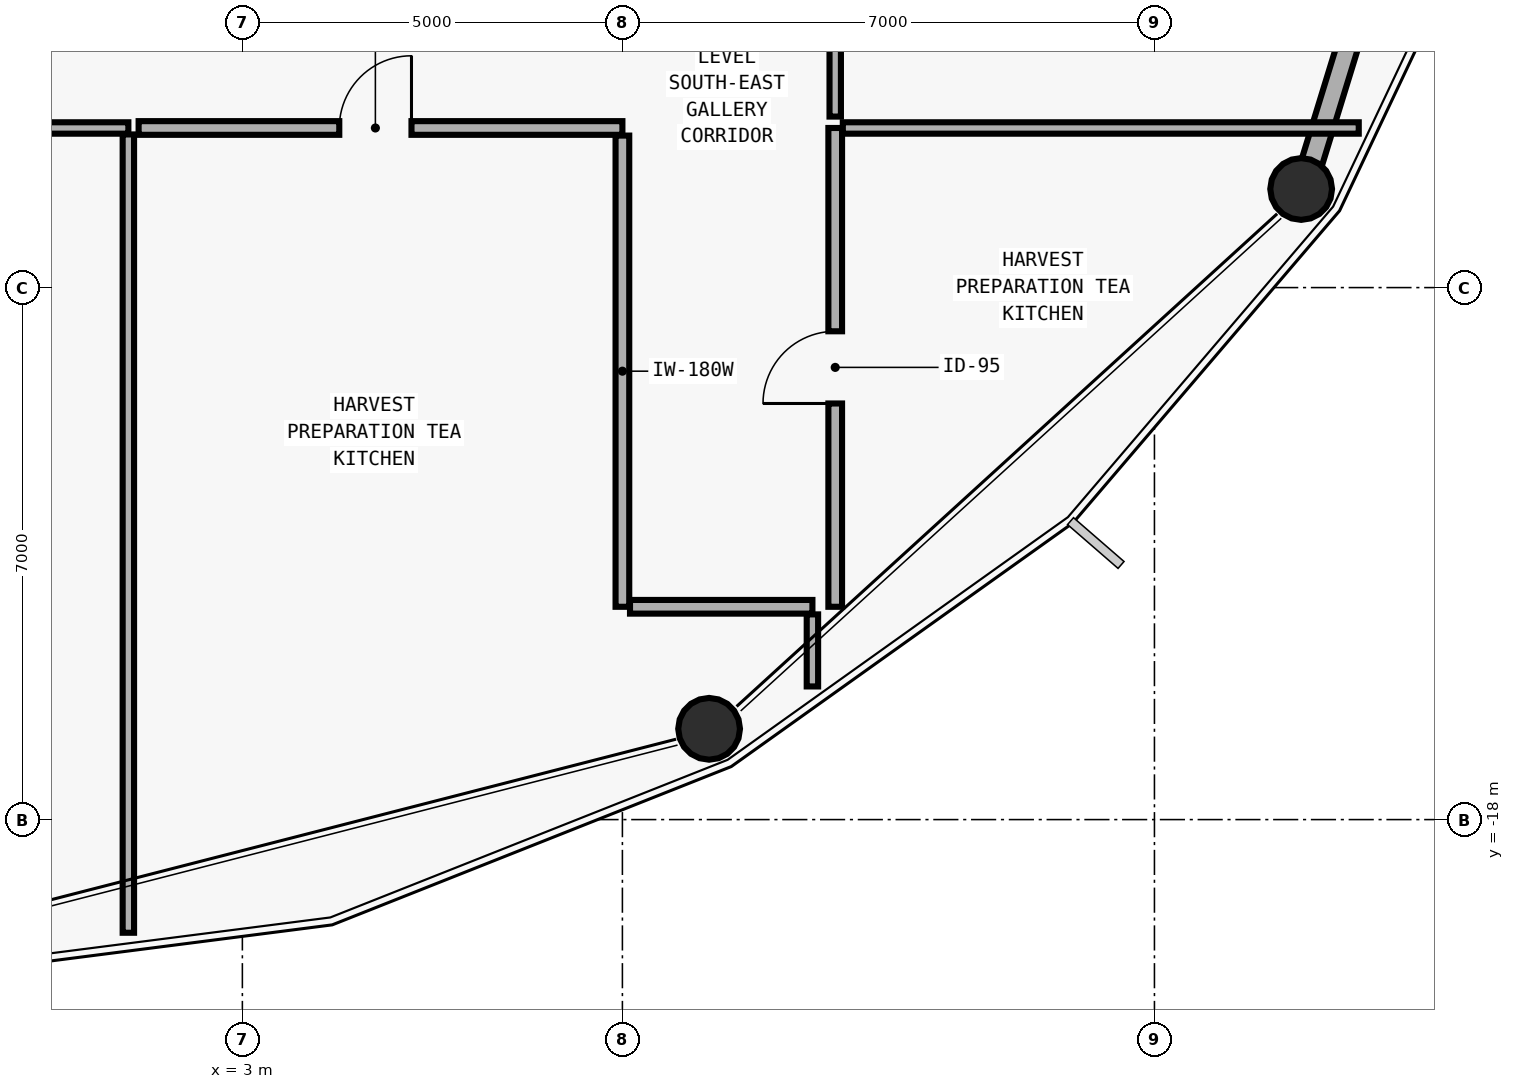
"""IFC4 building model, lengths in metres.
Left out: names, types, materials, properties, quantities, classifications, styles, units other than length and angle.
Written with IfcOpenShell. Run it as: python <this file> out.ifc"""

import sys

from ifc_helpers import new_model, si_unit, direction, frame, frame_2d, origin, origin_2d, place, context, subcontext, project, spatial, rectangle, hollow_circle, extrude, element, fill, save


model = new_model("IFC4")
c1 = context("Model", 3, precision=1e-05, world=origin(), true_north=direction((0.0, 1.0)))
c2 = subcontext(c1, "Body", "Model", "MODEL_VIEW")
j1 = project(units=[si_unit("LENGTHUNIT", "METRE"), si_unit("PLANEANGLEUNIT", "RADIAN")], contexts=[c1])
p1 = place(None, origin())
s1 = spatial("IfcSite", under=j1, at=p1, CompositionType="ELEMENT")
p2 = place(p1, origin())
s2 = spatial("IfcBuilding", under=s1, at=p2, CompositionType="ELEMENT")
p3 = place(p2, frame((0.0, 0.0, 111.0)))
s3 = spatial("IfcBuildingStorey", under=s2, at=p3, CompositionType="ELEMENT", Elevation=111.0)
p4 = place(p3, frame((9.157, -16.826, 0.0), z_axis=(-0.008630758912, 0.010457707878, 0.999908068948), x_axis=(-0.771259229251, -0.636521171129, 0.0)))
e1 = element("IfcColumn", 1, at=p4, inside=s3, PredefinedType="COLUMN", context=c2, shape_type="SweptSolid", body=[
    extrude(hollow_circle(Radius=0.406, WallThickness=0.03, at=origin_2d()), origin(), (0.0, 0.0, 1.0), 3.875),
])
p5 = place(p3, frame((16.959, -9.715, 0.0), z_axis=(-0.014930012538, 0.006110595849, 0.999869869205), x_axis=(-0.378784893666, -0.925484740193, 0.0)))
e2 = element("IfcColumn", 2, at=p5, inside=s3, PredefinedType="COLUMN", context=c2, shape_type="SweptSolid", body=[
    extrude(hollow_circle(Radius=0.406, WallThickness=0.03, at=origin_2d()), origin(), (0.0, 0.0, 1.0), 3.875),
])
p6 = place(p3, frame((19.844, -0.345, 0.0), z_axis=(0.0, 0.0, 1.0), x_axis=(-0.294220311177, -0.95573762534, 0.0)))
e3 = element("IfcWall", 3, at=p6, inside=s3, PredefinedType="SOLIDWALL", context=c2, shape_type="SweptSolid", body=[
    extrude(rectangle(XDim=9.441, YDim=0.28, at=frame_2d((4.721, 0.0))), origin(), (0.0, 0.0, 1.0), 3.11),
])
p7 = place(p3, frame((-7.865, -8.9, 0.0), z_axis=(0.0, 0.0, 1.0), x_axis=(1.0, 0.0, 0.0)))
e4 = element("IfcWall", 4, at=p7, inside=s3, PredefinedType="PARTITIONING", context=c2, shape_type="SweptSolid", body=[
    extrude(rectangle(XDim=9.365, YDim=0.15, at=frame_2d((4.683, 0.0))), origin(), (0.0, 0.0, 1.0), 3.64),
])
p8 = place(p7, frame((4.14, 0.0, 0.0)))
e5 = element("IfcOpeningElement", 5, at=p8, cuts=e4, PredefinedType="OPENING", context=c2, shape_type="SweptSolid", body=[
    extrude(rectangle(XDim=0.95, YDim=2.1, at=frame_2d((0.475, 1.05))), frame((0.0, 0.085, 0.0), z_axis=(0.0, -1.0, 0.0), x_axis=(1.0, 0.0, 0.0)), (0.0, 0.0, 1.0), 0.17),
])
p9 = place(p3, frame((1.635, -8.9, 0.0), z_axis=(0.0, 0.0, 1.0), x_axis=(1.0, 0.0, 0.0)))
e6 = element("IfcWall", 6, at=p9, inside=s3, PredefinedType="PLUMBINGWALL", context=c2, shape_type="SweptSolid", body=[
    extrude(rectangle(XDim=6.365, YDim=0.18, at=frame_2d((3.183, 0.0))), origin(), (0.0, 0.0, 1.0), 3.64),
])
p10 = place(p9, frame((2.64, 0.0, 0.0)))
e7 = element("IfcOpeningElement", 7, at=p10, cuts=e6, PredefinedType="OPENING", context=c2, shape_type="SweptSolid", body=[
    extrude(rectangle(XDim=0.95, YDim=2.1, at=frame_2d((0.475, 1.05))), frame((0.0, 0.1, 0.0), z_axis=(0.0, -1.0, 0.0), x_axis=(1.0, 0.0, 0.0)), (0.0, 0.0, 1.0), 0.2),
])
p11 = place(p3, frame((10.8, -15.2, 0.0), z_axis=(0.0, 0.0, 1.0), x_axis=(0.0, 1.0, 0.0)))
e8 = element("IfcWall", 8, at=p11, inside=s3, PredefinedType="PLUMBINGWALL", context=c2, shape_type="SweptSolid", body=[
    extrude(rectangle(XDim=6.3, YDim=0.18, at=frame_2d((3.15, 0.0))), origin(), (0.0, 0.0, 1.0), 3.64),
])
p12 = place(p11, frame((2.675, 0.0, 0.0)))
e9 = element("IfcOpeningElement", 9, at=p12, cuts=e8, PredefinedType="OPENING", context=c2, shape_type="SweptSolid", body=[
    extrude(rectangle(XDim=0.95, YDim=2.1, at=frame_2d((0.475, 1.05))), frame((0.0, 0.1, 0.0), z_axis=(0.0, -1.0, 0.0), x_axis=(1.0, 0.0, 0.0)), (0.0, 0.0, 1.0), 0.2),
])
p13 = place(p3, frame((1.5, -8.985, 0.0), z_axis=(0.0, 0.0, 1.0), x_axis=(0.0, -1.0, 0.0)))
e10 = element("IfcWall", 10, at=p13, inside=s3, PredefinedType="PARTITIONING", context=c2, shape_type="SweptSolid", body=[
    extrude(rectangle(XDim=10.504, YDim=0.15, at=frame_2d((5.252, 0.0))), origin(), (0.0, 0.0, 1.0), 3.64),
])
p14 = place(p3, frame((8.0, -9.0, 0.0), z_axis=(0.0, 0.0, 1.0), x_axis=(0.0, -1.0, 0.0)))
e11 = element("IfcWall", 11, at=p14, inside=s3, PredefinedType="PLUMBINGWALL", context=c2, shape_type="SweptSolid", body=[
    extrude(rectangle(XDim=6.2, YDim=0.18, at=frame_2d((3.1, 0.0))), origin(), (0.0, 0.0, 1.0), 3.022),
])
p15 = place(p3, frame((8.1, -15.2, 0.0), z_axis=(0.0, 0.0, 1.0), x_axis=(1.0, 0.0, 0.0)))
e12 = element("IfcWall", 12, at=p15, inside=s3, PredefinedType="PLUMBINGWALL", context=c2, shape_type="SweptSolid", body=[
    extrude(rectangle(XDim=2.4, YDim=0.18, at=frame_2d((1.2, 0.0))), origin(), (0.0, 0.0, 1.0), 3.64),
])
p16 = place(p3, frame((10.5, -15.3, 0.0), z_axis=(0.0, 0.0, 1.0), x_axis=(0.0, -1.0, 0.0)))
e13 = element("IfcWall", 13, at=p16, inside=s3, PredefinedType="PARTITIONING", context=c2, shape_type="SweptSolid", body=[
    extrude(rectangle(XDim=0.948, YDim=0.15, at=frame_2d((0.474, 0.0))), origin(), (0.0, 0.0, 1.0), 3.64),
])
p17 = place(p3, frame((10.9, -8.9, 0.0), z_axis=(0.0, 0.0, 1.0), x_axis=(1.0, 0.0, 0.0)))
e14 = element("IfcWall", 14, at=p17, inside=s3, PredefinedType="PARTITIONING", context=c2, shape_type="SweptSolid", body=[
    extrude(rectangle(XDim=6.788, YDim=0.15, at=frame_2d((3.394, 0.0))), origin(), (0.0, 0.0, 1.0), 3.022),
])
p18 = place(p3, frame((10.8, -8.75, 0.0), z_axis=(0.0, 0.0, 1.0), x_axis=(0.0, 1.0, 0.0)))
e15 = element("IfcWall", 15, at=p18, inside=s3, PredefinedType="PARTITIONING", context=c2, shape_type="SweptSolid", body=[
    extrude(rectangle(XDim=2.15, YDim=0.15, at=frame_2d((1.075, 0.0))), origin(), (0.0, 0.0, 1.0), 3.64),
])
p19 = place(p10, origin())
e16 = element("IfcDoor", 16, at=p19, inside=s3, OperationType="SINGLE_SWING_RIGHT", PredefinedType="DOOR", context=c2, shape_type="SweptSolid", body=[
    extrude(rectangle(XDim=0.95, YDim=2.1, at=frame_2d((0.475, 1.05))), frame((0.0, 0.025, 0.0), z_axis=(0.0, -1.0, 0.0), x_axis=(1.0, 0.0, 0.0)), (0.0, 0.0, 1.0), 0.05),
])
fill(e7, e16)
p20 = place(p12, origin())
e17 = element("IfcDoor", 17, at=p20, inside=s3, OperationType="SINGLE_SWING_LEFT", PredefinedType="DOOR", context=c2, shape_type="SweptSolid", body=[
    extrude(rectangle(XDim=0.95, YDim=2.1, at=frame_2d((0.475, 1.05))), frame((0.0, 0.025, 0.0), z_axis=(0.0, -1.0, 0.0), x_axis=(1.0, 0.0, 0.0)), (0.0, 0.0, 1.0), 0.05),
])
fill(e9, e17)
save(model, sys.argv[1])
